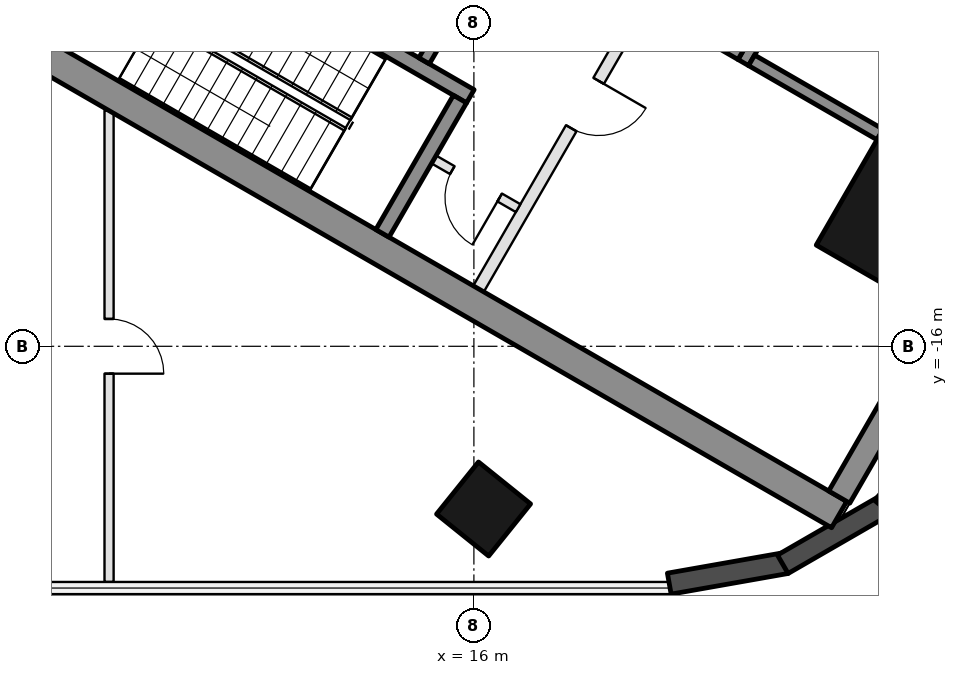
"""IFC4 building model, lengths in metres.
Left out: names, types, materials, properties, quantities, classifications, styles, units other than length and angle.
Written with IfcOpenShell. Run it as: python <this file> out.ifc"""

import sys

from ifc_helpers import new_model, si_unit, direction, frame, frame_2d, origin, origin_2d, place, context, subcontext, project, spatial, rectangle, hollow_rectangle, extrude, boolean, halfspace, element, fill, save


model = new_model("IFC4")
c1 = context("Model", 3, precision=1e-05, world=origin(), true_north=direction((0.0, 1.0)))
c2 = subcontext(c1, "Body", "Model", "MODEL_VIEW")
j1 = project(units=[si_unit("LENGTHUNIT", "METRE"), si_unit("PLANEANGLEUNIT", "RADIAN")], contexts=[c1])
p1 = place(None, origin())
s1 = spatial("IfcSite", under=j1, at=p1, CompositionType="ELEMENT")
p2 = place(p1, origin())
s2 = spatial("IfcBuilding", under=s1, at=p2, CompositionType="ELEMENT")
p3 = place(p2, frame((0.0, 0.0, 23.5)))
s3 = spatial("IfcBuildingStorey", under=s2, at=p3, CompositionType="ELEMENT", Elevation=23.5)
p4 = place(p3, frame((16.159, -18.676, 0.0), z_axis=(-0.041995221245, 0.052226075608, 0.997751892215), x_axis=(0.999116711053, 0.000712967272, 0.042015346876)))
e1 = element("IfcColumn", 1, at=p4, inside=s3, PredefinedType="COLUMN", context=c2, shape_type="SweptSolid", body=[
    boolean("DIFFERENCE", boolean("DIFFERENCE", extrude(hollow_rectangle(XDim=1.1, YDim=1.1, WallThickness=0.05, at=origin_2d()), origin(), (0.0, 0.0, 1.0), 5.011), halfspace(frame((0.0, 0.0, 0.017), z_axis=(0.0, 0.0, 1.0), x_axis=(1.0, 0.0, 0.0)), True)), halfspace(frame((0.0, 0.0, 4.999), z_axis=(0.0, 0.0, 1.0), x_axis=(1.0, 0.0, 0.0)), False)),
])
p5 = place(p3, frame((23.556, -13.6, 0.0), z_axis=(0.0, 0.0, 1.0), x_axis=(0.5, 0.866025403784, 0.0)))
e2 = element("IfcColumn", 2, at=p5, inside=s3, PredefinedType="COLUMN", context=c2, shape_type="SweptSolid", body=[
    extrude(hollow_rectangle(XDim=3.2, YDim=2.6, WallThickness=0.08, at=origin_2d()), origin(), (0.0, 0.0, 1.0), 5.0),
])
for number, where, z_axis, x_axis in (
    (3, (19.213, -19.904, 0.0), (0.0, 0.0, 1.0), (0.985, 0.174, 0.0)),
    (4, (21.08, -19.585, 0.0), (0.0, 0.0, 1.0), (0.866, 0.5, 0.0)),
    (5, (22.725, -18.647, 0.0), (0.0, 0.0, 1.0), (0.643, 0.766, 0.0)),
):
    element("IfcWall", number, at=place(p3, frame(where, z_axis=z_axis, x_axis=x_axis)), inside=s3, PredefinedType="SOLIDWALL", context=c2, shape_type="SweptSolid", body=[
        extrude(rectangle(XDim=1.954, YDim=0.35, at=frame_2d((0.977, 0.0))), origin(), (0.0, 0.0, 1.0), 4.7),
    ])
p6 = place(p3, frame((8.547, -10.997, 0.0), z_axis=(0.0, 0.0, 1.0), x_axis=(0.866025760136, -0.499999382781, 0.0)))
e6 = element("IfcWall", 6, at=p6, inside=s3, PredefinedType="SHEAR", context=c2, shape_type="SweptSolid", body=[
    extrude(rectangle(XDim=15.542, YDim=0.5, at=frame_2d((7.771, 0.0))), origin(), (0.0, 0.0, 1.0), 4.7),
])
p7 = place(p3, frame((22.009, -18.48, 0.0), z_axis=(0.0, 0.0, 1.0), x_axis=(0.500008388397, 0.866020560687, 0.0)))
e7 = element("IfcWall", 7, at=p7, inside=s3, PredefinedType="SHEAR", context=c2, shape_type="SweptSolid", body=[
    extrude(rectangle(XDim=3.4, YDim=0.4, at=frame_2d((1.7, 0.0))), origin(), (0.0, 0.0, 1.0), 4.7),
])
p8 = place(p3, frame((10.356, -8.664, 0.0), z_axis=(0.0, 0.0, 1.0), x_axis=(0.866028629588, -0.499994412703, 0.0)))
e8 = element("IfcWall", 8, at=p8, inside=s3, PredefinedType="SHEAR", context=c2, shape_type="SweptSolid", body=[
    extrude(rectangle(XDim=6.45, YDim=0.25, at=frame_2d((3.225, 0.0))), origin(), (0.0, 0.0, 1.0), 4.7),
])
p9 = place(p8, frame((0.3, 0.0, 0.0)))
e9 = element("IfcOpeningElement", 9, at=p9, cuts=e8, PredefinedType="OPENING", context=c2, shape_type="SweptSolid", body=[
    extrude(rectangle(XDim=1.0, YDim=2.1, at=frame_2d((0.5, 1.05))), frame((0.0, 0.135, 0.0), z_axis=(0.0, -1.0, 0.0), x_axis=(1.0, 0.0, 0.0)), (0.0, 0.0, 1.0), 0.27),
])
p10 = place(p3, frame((14.496, -14.143, 0.0), z_axis=(0.0, 0.0, 1.0), x_axis=(0.500062241894, 0.865989465428, 0.0)))
e10 = element("IfcWall", 10, at=p10, inside=s3, PredefinedType="SHEAR", context=c2, shape_type="SweptSolid", body=[
    extrude(rectangle(XDim=2.55, YDim=0.25, at=frame_2d((1.275, 0.0))), origin(), (0.0, 0.0, 1.0), 4.7),
])
p11 = place(p3, frame((15.181, -11.305, 0.0), z_axis=(0.0, 0.0, 1.0), x_axis=(0.49994636267, 0.866056369097, 0.0)))
e11 = element("IfcWall", 11, at=p11, inside=s3, PredefinedType="SHEAR", context=c2, shape_type="SweptSolid", body=[
    extrude(rectangle(XDim=2.8, YDim=0.2, at=frame_2d((1.4, 0.0))), origin(), (0.0, 0.0, 1.0), 4.7),
])
p12 = place(p3, frame((20.43, -11.333, 0.0), z_axis=(0.0, 0.0, 1.0), x_axis=(0.500001309137, 0.866024647952, 0.0)))
e12 = element("IfcWall", 12, at=p12, inside=s3, PredefinedType="SHEAR", context=c2, shape_type="SweptSolid", body=[
    extrude(rectangle(XDim=2.4, YDim=0.2, at=frame_2d((1.2, 0.0))), origin(), (0.0, 0.0, 1.0), 4.7),
])
p13 = place(p12, frame((0.85, 0.0, 0.0)))
e13 = element("IfcOpeningElement", 13, at=p13, cuts=e12, PredefinedType="OPENING", context=c2, shape_type="SweptSolid", body=[
    extrude(rectangle(XDim=0.9, YDim=2.1, at=frame_2d((0.45, 1.05))), frame((0.0, 0.11, 0.0), z_axis=(0.0, -1.0, 0.0), x_axis=(1.0, 0.0, 0.0)), (0.0, 0.0, 1.0), 0.22),
])
p14 = place(p3, frame((18.913, -10.342, 0.0), z_axis=(0.0, 0.0, 1.0), x_axis=(0.866038183914, -0.499977863513, 0.0)))
e14 = element("IfcWall", 14, at=p14, inside=s3, PredefinedType="SHEAR", context=c2, shape_type="SweptSolid", body=[
    extrude(rectangle(XDim=1.71, YDim=0.2, at=frame_2d((0.855, 0.0))), origin(), (0.0, 0.0, 1.0), 4.7),
])
p15 = place(p3, frame((20.567, -11.297, 0.0), z_axis=(0.0, 0.0, 1.0), x_axis=(0.866048967903, -0.499959183527, 0.0)))
e15 = element("IfcWall", 15, at=p15, inside=s3, PredefinedType="SHEAR", context=c2, shape_type="SweptSolid", body=[
    extrude(rectangle(XDim=2.44, YDim=0.2, at=frame_2d((1.22, 0.0))), origin(), (0.0, 0.0, 1.0), 4.7),
])
p16 = place(p3, frame((16.076, -15.055, 0.0), z_axis=(0.0, 0.0, 1.0), x_axis=(0.499995103361, 0.866028230842, 0.0)))
e16 = element("IfcWall", 16, at=p16, inside=s3, PredefinedType="PARTITIONING", context=c2, shape_type="SweptSolid", body=[
    extrude(rectangle(XDim=5.4, YDim=0.2, at=frame_2d((2.7, 0.0))), origin(), (0.0, 0.0, 1.0), 4.7),
])
p17 = place(p16, frame((3.05, 0.0, 0.0)))
e17 = element("IfcOpeningElement", 17, at=p17, cuts=e16, PredefinedType="OPENING", context=c2, shape_type="SweptSolid", body=[
    extrude(rectangle(XDim=0.9, YDim=2.1, at=frame_2d((0.45, 1.05))), frame((0.0, 0.11, 0.0), z_axis=(0.0, -1.0, 0.0), x_axis=(1.0, 0.0, 0.0)), (0.0, 0.0, 1.0), 0.22),
])
p18 = place(p3, frame((15.342, -12.928, 0.0), z_axis=(0.0, 0.0, 1.0), x_axis=(0.865989903783, -0.500061482766, 0.0)))
e18 = element("IfcWall", 18, at=p18, inside=s3, PredefinedType="PARTITIONING", context=c2, shape_type="SweptSolid", body=[
    extrude(rectangle(XDim=1.6, YDim=0.15, at=frame_2d((0.8, 0.0))), origin(), (0.0, 0.0, 1.0), 4.7),
])
p19 = place(p18, frame((0.35, 0.0, 0.0)))
e19 = element("IfcOpeningElement", 19, at=p19, cuts=e18, PredefinedType="OPENING", context=c2, shape_type="SweptSolid", body=[
    extrude(rectangle(XDim=0.9, YDim=2.1, at=frame_2d((0.45, 1.05))), frame((0.0, 0.085, 0.0), z_axis=(0.0, -1.0, 0.0), x_axis=(1.0, 0.0, 0.0)), (0.0, 0.0, 1.0), 0.17),
])
p20 = place(p3, frame((10.0, -19.876, 0.0), z_axis=(0.0, 0.0, 1.0), x_axis=(0.0, 1.0, 0.0)))
e20 = element("IfcWall", 20, at=p20, inside=s3, PredefinedType="PARTITIONING", context=c2, shape_type="SweptSolid", body=[
    extrude(rectangle(XDim=7.752, YDim=0.15, at=frame_2d((3.876, 0.0))), origin(), (0.0, 0.0, 1.0), 4.1),
])
p21 = place(p20, frame((3.426, 0.0, 0.0)))
e21 = element("IfcOpeningElement", 21, at=p21, cuts=e20, PredefinedType="OPENING", context=c2, shape_type="SweptSolid", body=[
    extrude(rectangle(XDim=0.9, YDim=2.1, at=frame_2d((0.45, 1.05))), frame((0.0, 0.085, 0.0), z_axis=(0.0, -1.0, 0.0), x_axis=(1.0, 0.0, 0.0)), (0.0, 0.0, 1.0), 0.17),
])
p22 = place(p19, frame((0.9, 0.0, 0.0), z_axis=(0.0, 0.0, 1.0), x_axis=(-1.0, 0.0, 0.0)))
e22 = element("IfcDoor", 22, at=p22, inside=s3, OperationType="SINGLE_SWING_LEFT", PredefinedType="DOOR", context=c2, shape_type="SweptSolid", body=[
    extrude(rectangle(XDim=0.9, YDim=2.1, at=frame_2d((0.45, 1.05))), frame((0.0, 0.025, 0.0), z_axis=(0.0, -1.0, 0.0), x_axis=(1.0, 0.0, 0.0)), (0.0, 0.0, 1.0), 0.05),
])
fill(e19, e22)
p23 = place(p17, frame((0.9, 0.0, 0.0), z_axis=(0.0, 0.0, 1.0), x_axis=(-1.0, 0.0, 0.0)))
e23 = element("IfcDoor", 23, at=p23, inside=s3, OperationType="SINGLE_SWING_LEFT", PredefinedType="DOOR", context=c2, shape_type="SweptSolid", body=[
    extrude(rectangle(XDim=0.9, YDim=2.1, at=frame_2d((0.45, 1.05))), frame((0.0, 0.025, 0.0), z_axis=(0.0, -1.0, 0.0), x_axis=(1.0, 0.0, 0.0)), (0.0, 0.0, 1.0), 0.05),
])
fill(e17, e23)
p24 = place(p21, frame((0.9, 0.0, 0.0), z_axis=(0.0, 0.0, 1.0), x_axis=(-1.0, 0.0, 0.0)))
e24 = element("IfcDoor", 24, at=p24, inside=s3, OperationType="SINGLE_SWING_RIGHT", PredefinedType="DOOR", context=c2, shape_type="SweptSolid", body=[
    extrude(rectangle(XDim=0.9, YDim=2.1, at=frame_2d((0.45, 1.05))), frame((0.0, 0.025, 0.0), z_axis=(0.0, -1.0, 0.0), x_axis=(1.0, 0.0, 0.0)), (0.0, 0.0, 1.0), 0.05),
])
fill(e21, e24)
save(model, sys.argv[1])
